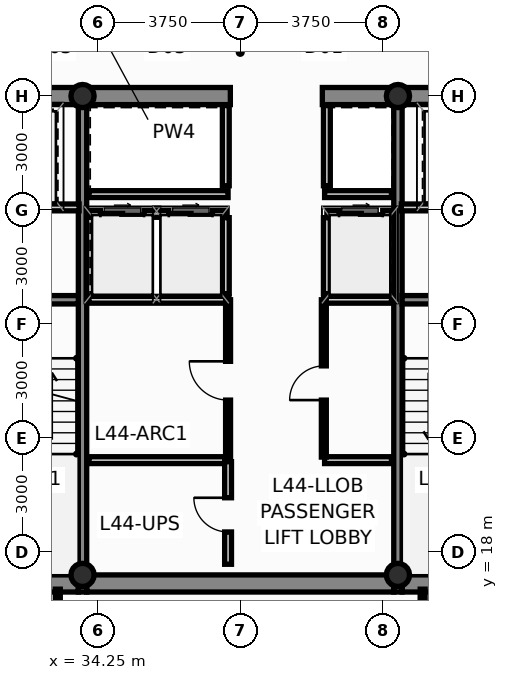
"""IFC4 building model, lengths in metres.
Left out: names, types, materials, properties, quantities, classifications, styles, units other than length and angle.
Written with IfcOpenShell. Run it as: python <this file> out.ifc"""

import sys

from ifc_helpers import new_model, si_unit, direction, frame, frame_2d, origin, origin_2d, place, context, subcontext, project, spatial, rectangle, hollow_circle, extrude, source, transform, mapped, element, fill, save


model = new_model("IFC4")
c1 = context("Model", 3, precision=1e-05, world=origin(), true_north=direction((0.0, 1.0)))
c2 = subcontext(c1, "Body", "Model", "MODEL_VIEW")
j1 = project(units=[si_unit("LENGTHUNIT", "METRE"), si_unit("PLANEANGLEUNIT", "RADIAN")], contexts=[c1])
p1 = place(None, origin())
s1 = spatial("IfcSite", under=j1, at=p1, CompositionType="ELEMENT")
p2 = place(p1, origin())
s2 = spatial("IfcBuilding", under=s1, at=p2, CompositionType="ELEMENT")
p3 = place(p2, frame((0.0, 0.0, 169.45)))
s3 = spatial("IfcBuildingStorey", under=s2, at=p3, CompositionType="ELEMENT", Elevation=169.45)
m1 = source(origin(), c2, "Body", "SweptSolid", [
    extrude(hollow_circle(Radius=0.305, WallThickness=0.025, at=origin_2d()), origin(), (0.0, 0.0, 1.0), 3.65),
])
for number, where, z_axis, x_axis in (
    (1, (33.85, 17.4, 0.0), (0.0, 0.0, 1.0), (1.0, 0.0, 0.0)),
    (2, (42.15, 17.4, 0.0), (0.0, 0.0, 1.0), (1.0, 0.0, 0.0)),
    (3, (33.85, 30.0, 0.0), (0.0, 0.0, 1.0), (1.0, 0.0, 0.0)),
    (4, (42.15, 30.0, 0.0), (0.0, 0.0, 1.0), (1.0, 0.0, 0.0)),
):
    element("IfcColumn", number, at=place(p3, frame(where, z_axis=z_axis, x_axis=x_axis)), inside=s3, PredefinedType="COLUMN", context=c2, shape_type="MappedRepresentation", body=[
        mapped(m1, transform((0.0, 0.0, 0.0), scale=1.0)),
    ])
p4 = place(p3, frame((30.84, 17.175, 0.0), z_axis=(0.0, 0.0, 1.0), x_axis=(1.0, 0.0, 0.0)))
e5 = element("IfcWall", 5, at=p4, inside=s3, PredefinedType="SHEAR", context=c2, shape_type="SweptSolid", body=[
    extrude(rectangle(XDim=2.9, YDim=0.45, at=frame_2d((1.45, 0.0))), origin(), (0.0, 0.0, 1.0), 3.65),
])
p5 = place(p3, frame((33.96, 17.175, 0.0), z_axis=(0.0, 0.0, 1.0), x_axis=(1.0, 0.0, 0.0)))
e6 = element("IfcWall", 6, at=p5, inside=s3, PredefinedType="SHEAR", context=c2, shape_type="SweptSolid", body=[
    extrude(rectangle(XDim=8.08, YDim=0.45, at=frame_2d((4.04, 0.0))), origin(), (0.0, 0.0, 1.0), 3.65),
])
for number, where, z_axis, x_axis in (
    (7, (42.26, 17.175, 0.0), (0.0, 0.0, 1.0), (1.0, 0.0, 0.0)),
    (8, (30.84, 30.0, 0.0), (0.0, 0.0, 1.0), (1.0, 0.0, 0.0)),
):
    element("IfcWall", number, at=place(p3, frame(where, z_axis=z_axis, x_axis=x_axis)), inside=s3, PredefinedType="SHEAR", context=c2, shape_type="SweptSolid", body=[
        extrude(rectangle(XDim=2.9, YDim=0.45, at=frame_2d((1.45, 0.0))), origin(), (0.0, 0.0, 1.0), 3.65),
    ])
p6 = place(p3, frame((33.96, 30.0, 0.0), z_axis=(0.0, 0.0, 1.0), x_axis=(1.0, 0.0, 0.0)))
e9 = element("IfcWall", 9, at=p6, inside=s3, PredefinedType="SHEAR", context=c2, shape_type="SweptSolid", body=[
    extrude(rectangle(XDim=3.78, YDim=0.45, at=frame_2d((1.89, 0.0))), origin(), (0.0, 0.0, 1.0), 3.65),
])
p7 = place(p3, frame((40.16, 30.0, 0.0), z_axis=(0.0, 0.0, 1.0), x_axis=(1.0, 0.0, 0.0)))
e10 = element("IfcWall", 10, at=p7, inside=s3, PredefinedType="SHEAR", context=c2, shape_type="SweptSolid", body=[
    extrude(rectangle(XDim=1.88, YDim=0.45, at=frame_2d((0.94, 0.0))), origin(), (0.0, 0.0, 1.0), 3.65),
])
p8 = place(p3, frame((42.26, 30.0, 0.0), z_axis=(0.0, 0.0, 1.0), x_axis=(1.0, 0.0, 0.0)))
e11 = element("IfcWall", 11, at=p8, inside=s3, PredefinedType="SHEAR", context=c2, shape_type="SweptSolid", body=[
    extrude(rectangle(XDim=2.9, YDim=0.45, at=frame_2d((1.45, 0.0))), origin(), (0.0, 0.0, 1.0), 3.65),
])
for number, where, z_axis, x_axis in (
    (12, (33.85, 16.95, 0.0), (0.0, 0.0, 1.0), (0.0, 1.0, 0.0)),
    (13, (42.15, 16.95, 0.0), (0.0, 0.0, 1.0), (0.0, 1.0, 0.0)),
):
    element("IfcWall", number, at=place(p3, frame(where, z_axis=z_axis, x_axis=x_axis)), inside=s3, PredefinedType="SHEAR", context=c2, shape_type="SweptSolid", body=[
        extrude(rectangle(XDim=13.275, YDim=0.22, at=frame_2d((6.638, 0.0))), origin(), (0.0, 0.0, 1.0), 3.65),
    ])
for number, where, z_axis, x_axis in (
    (14, (30.84, 24.64, 0.0), (0.0, 0.0, 1.0), (1.0, 0.0, 0.0)),
    (15, (42.26, 24.64, 0.0), (0.0, 0.0, 1.0), (1.0, 0.0, 0.0)),
):
    element("IfcWall", number, at=place(p3, frame(where, z_axis=z_axis, x_axis=x_axis)), inside=s3, PredefinedType="SHEAR", context=c2, shape_type="SweptSolid", body=[
        extrude(rectangle(XDim=2.9, YDim=0.22, at=frame_2d((1.45, 0.0))), origin(), (0.0, 0.0, 1.0), 3.65),
    ])
p9 = place(p3, frame((34.02, 26.9, 0.0), z_axis=(0.0, 0.0, 1.0), x_axis=(1.0, 0.0, 0.0)))
e16 = element("IfcWall", 16, at=p9, inside=s3, PredefinedType="PARTITIONING", context=c2, shape_type="SweptSolid", body=[
    extrude(rectangle(XDim=3.6, YDim=0.18, at=frame_2d((1.8, 0.0))), origin(), (0.0, 0.0, 1.0), 3.4),
])
p10 = place(p9, frame((0.3, 0.0, 0.0)))
e17 = element("IfcOpeningElement", 17, at=p10, cuts=e16, PredefinedType="OPENING", context=c2, shape_type="SweptSolid", body=[
    extrude(rectangle(XDim=1.15, YDim=2.2, at=frame_2d((0.575, 1.1))), frame((0.0, 0.102, 0.0), z_axis=(0.0, -1.0, 0.0), x_axis=(1.0, 0.0, 0.0)), (0.0, 0.0, 1.0), 0.204),
])
p11 = place(p9, frame((2.1, 0.0, 0.0)))
e18 = element("IfcOpeningElement", 18, at=p11, cuts=e16, PredefinedType="OPENING", context=c2, shape_type="SweptSolid", body=[
    extrude(rectangle(XDim=1.15, YDim=2.2, at=frame_2d((0.575, 1.1))), frame((0.0, 0.102, 0.0), z_axis=(0.0, -1.0, 0.0), x_axis=(1.0, 0.0, 0.0)), (0.0, 0.0, 1.0), 0.204),
])
p12 = place(p3, frame((40.28, 26.9, 0.0), z_axis=(0.0, 0.0, 1.0), x_axis=(1.0, 0.0, 0.0)))
e19 = element("IfcWall", 19, at=p12, inside=s3, PredefinedType="PARTITIONING", context=c2, shape_type="SweptSolid", body=[
    extrude(rectangle(XDim=1.7, YDim=0.18, at=frame_2d((0.85, 0.0))), origin(), (0.0, 0.0, 1.0), 3.4),
])
p13 = place(p12, frame((0.32, 0.0, 0.0)))
e20 = element("IfcOpeningElement", 20, at=p13, cuts=e19, PredefinedType="OPENING", context=c2, shape_type="SweptSolid", body=[
    extrude(rectangle(XDim=1.15, YDim=2.2, at=frame_2d((0.575, 1.1))), frame((0.0, 0.102, 0.0), z_axis=(0.0, -1.0, 0.0), x_axis=(1.0, 0.0, 0.0)), (0.0, 0.0, 1.0), 0.204),
])
for number, where, z_axis, x_axis in (
    (21, (37.62, 24.8, 0.0), (0.0, 0.0, 1.0), (0.0, 1.0, 0.0)),
    (22, (40.28, 24.8, 0.0), (0.0, 0.0, 1.0), (0.0, 1.0, 0.0)),
):
    element("IfcWall", number, at=place(p3, frame(where, z_axis=z_axis, x_axis=x_axis)), inside=s3, PredefinedType="PARTITIONING", context=c2, shape_type="SweptSolid", body=[
        extrude(rectangle(XDim=2.0, YDim=0.18, at=frame_2d((1.0, 0.0))), origin(), (0.0, 0.0, 1.0), 3.4),
    ])
p14 = place(p3, frame((34.02, 24.64, 0.0), z_axis=(0.0, 0.0, 1.0), x_axis=(1.0, 0.0, 0.0)))
e23 = element("IfcWall", 23, at=p14, inside=s3, PredefinedType="PARTITIONING", context=c2, shape_type="SweptSolid", body=[
    extrude(rectangle(XDim=3.68, YDim=0.18, at=frame_2d((1.84, 0.0))), origin(), (0.0, 0.0, 1.0), 3.4),
])
p15 = place(p3, frame((40.2, 24.64, 0.0), z_axis=(0.0, 0.0, 1.0), x_axis=(1.0, 0.0, 0.0)))
e24 = element("IfcWall", 24, at=p15, inside=s3, PredefinedType="PARTITIONING", context=c2, shape_type="SweptSolid", body=[
    extrude(rectangle(XDim=1.78, YDim=0.18, at=frame_2d((0.89, 0.0))), origin(), (0.0, 0.0, 1.0), 3.4),
])
p16 = place(p3, frame((34.02, 27.42, 0.0), z_axis=(0.0, 0.0, 1.0), x_axis=(1.0, 0.0, 0.0)))
e25 = element("IfcWall", 25, at=p16, inside=s3, PredefinedType="PARTITIONING", context=c2, shape_type="SweptSolid", body=[
    extrude(rectangle(XDim=3.66, YDim=0.18, at=frame_2d((1.83, 0.0))), origin(), (0.0, 0.0, 1.0), 3.4),
])
p17 = place(p3, frame((40.22, 27.42, 0.0), z_axis=(0.0, 0.0, 1.0), x_axis=(1.0, 0.0, 0.0)))
e26 = element("IfcWall", 26, at=p17, inside=s3, PredefinedType="PARTITIONING", context=c2, shape_type="SweptSolid", body=[
    extrude(rectangle(XDim=1.76, YDim=0.18, at=frame_2d((0.88, 0.0))), origin(), (0.0, 0.0, 1.0), 3.4),
])
for number, where, z_axis, x_axis in (
    (27, (37.62, 27.64, 0.0), (0.0, 0.0, 1.0), (0.0, 1.0, 0.0)),
    (28, (40.28, 27.64, 0.0), (0.0, 0.0, 1.0), (0.0, 1.0, 0.0)),
):
    element("IfcWall", number, at=place(p3, frame(where, z_axis=z_axis, x_axis=x_axis)), inside=s3, PredefinedType="PARTITIONING", context=c2, shape_type="SweptSolid", body=[
        extrude(rectangle(XDim=2.11, YDim=0.18, at=frame_2d((1.055, 0.0))), origin(), (0.0, 0.0, 1.0), 3.4),
    ])
for number, where, z_axis, x_axis in (
    (29, (30.86, 27.07, 0.0), (0.0, 0.0, 1.0), (1.0, 0.0, 0.0)),
    (30, (42.24, 27.07, 0.0), (0.0, 0.0, 1.0), (1.0, 0.0, 0.0)),
):
    element("IfcWall", number, at=place(p3, frame(where, z_axis=z_axis, x_axis=x_axis)), inside=s3, PredefinedType="PARTITIONING", context=c2, shape_type="SweptSolid", body=[
        extrude(rectangle(XDim=2.9, YDim=0.18, at=frame_2d((1.45, 0.0))), origin(), (0.0, 0.0, 1.0), 3.4),
    ])
p18 = place(p3, frame((34.02, 20.42, 0.0), z_axis=(0.0, 0.0, 1.0), x_axis=(1.0, 0.0, 0.0)))
e31 = element("IfcWall", 31, at=p18, inside=s3, PredefinedType="PARTITIONING", context=c2, shape_type="SweptSolid", body=[
    extrude(rectangle(XDim=3.64, YDim=0.18, at=frame_2d((1.82, 0.0))), origin(), (0.0, 0.0, 1.0), 3.4),
])
p19 = place(p3, frame((40.22, 20.42, 0.0), z_axis=(0.0, 0.0, 1.0), x_axis=(1.0, 0.0, 0.0)))
e32 = element("IfcWall", 32, at=p19, inside=s3, PredefinedType="PARTITIONING", context=c2, shape_type="SweptSolid", body=[
    extrude(rectangle(XDim=1.76, YDim=0.18, at=frame_2d((0.88, 0.0))), origin(), (0.0, 0.0, 1.0), 3.4),
])
p20 = place(p3, frame((37.68, 20.5, 0.0), z_axis=(0.0, 0.0, 1.0), x_axis=(0.0, 1.0, 0.0)))
e33 = element("IfcWall", 33, at=p20, inside=s3, PredefinedType="PARTITIONING", context=c2, shape_type="SweptSolid", body=[
    extrude(rectangle(XDim=4.14, YDim=0.13, at=frame_2d((2.07, 0.0))), origin(), (0.0, 0.0, 1.0), 3.4),
])
p21 = place(p20, frame((1.5, 0.0, 0.0)))
e34 = element("IfcOpeningElement", 34, at=p21, cuts=e33, PredefinedType="OPENING", context=c2, shape_type="SweptSolid", body=[
    extrude(rectangle(XDim=1.02, YDim=2.15, at=frame_2d((0.51, 1.075))), frame((0.0, 0.077, 0.0), z_axis=(0.0, -1.0, 0.0), x_axis=(1.0, 0.0, 0.0)), (0.0, 0.0, 1.0), 0.154),
])
p22 = place(p3, frame((40.2, 20.5, 0.0), z_axis=(0.0, 0.0, 1.0), x_axis=(0.0, 1.0, 0.0)))
e35 = element("IfcWall", 35, at=p22, inside=s3, PredefinedType="PARTITIONING", context=c2, shape_type="SweptSolid", body=[
    extrude(rectangle(XDim=4.14, YDim=0.13, at=frame_2d((2.07, 0.0))), origin(), (0.0, 0.0, 1.0), 3.4),
])
p23 = place(p22, frame((1.5, 0.0, 0.0)))
e36 = element("IfcOpeningElement", 36, at=p23, cuts=e35, PredefinedType="OPENING", context=c2, shape_type="SweptSolid", body=[
    extrude(rectangle(XDim=0.9, YDim=2.1, at=frame_2d((0.45, 1.05))), frame((0.0, 0.077, 0.0), z_axis=(0.0, -1.0, 0.0), x_axis=(1.0, 0.0, 0.0)), (0.0, 0.0, 1.0), 0.154),
])
p24 = place(p3, frame((37.68, 17.68, 0.0), z_axis=(0.0, 0.0, 1.0), x_axis=(0.0, 1.0, 0.0)))
e37 = element("IfcWall", 37, at=p24, inside=s3, PredefinedType="PARTITIONING", context=c2, shape_type="SweptSolid", body=[
    extrude(rectangle(XDim=2.7, YDim=0.18, at=frame_2d((1.35, 0.0))), origin(), (0.0, 0.0, 1.0), 3.4),
])
p25 = place(p24, frame((0.85, 0.0, 0.0)))
e38 = element("IfcOpeningElement", 38, at=p25, cuts=e37, PredefinedType="OPENING", context=c2, shape_type="SweptSolid", body=[
    extrude(rectangle(XDim=0.9, YDim=2.1, at=frame_2d((0.45, 1.05))), frame((0.0, 0.102, 0.0), z_axis=(0.0, -1.0, 0.0), x_axis=(1.0, 0.0, 0.0)), (0.0, 0.0, 1.0), 0.204),
])
for number, where, z_axis, x_axis in (
    (39, (33.2, 12.555, 0.0), (0.0, 0.0, 1.0), (0.0, 1.0, 0.0)),
    (40, (42.8, 12.555, 0.0), (0.0, 0.0, 1.0), (0.0, 1.0, 0.0)),
):
    element("IfcWall", number, at=place(p3, frame(where, z_axis=z_axis, x_axis=x_axis)), inside=s3, PredefinedType="PARTITIONING", context=c2, shape_type="SweptSolid", body=[
        extrude(rectangle(XDim=4.47, YDim=0.13, at=frame_2d((2.235, 0.0))), origin(), (0.0, 0.0, 1.0), 3.4),
    ])
p26 = place(p10, origin())
e41 = element("IfcDoor", 41, at=p26, inside=s3, OperationType="SLIDING_TO_LEFT", PredefinedType="DOOR", context=c2, shape_type="SweptSolid", body=[
    extrude(rectangle(XDim=1.15, YDim=2.2, at=frame_2d((0.575, 1.1))), frame((0.0, 0.025, 0.0), z_axis=(0.0, -1.0, 0.0), x_axis=(1.0, 0.0, 0.0)), (0.0, 0.0, 1.0), 0.05),
])
fill(e17, e41)
p27 = place(p11, origin())
e42 = element("IfcDoor", 42, at=p27, inside=s3, OperationType="SLIDING_TO_RIGHT", PredefinedType="DOOR", context=c2, shape_type="SweptSolid", body=[
    extrude(rectangle(XDim=1.15, YDim=2.2, at=frame_2d((0.575, 1.1))), frame((0.0, 0.025, 0.0), z_axis=(0.0, -1.0, 0.0), x_axis=(1.0, 0.0, 0.0)), (0.0, 0.0, 1.0), 0.05),
])
fill(e18, e42)
p28 = place(p13, origin())
e43 = element("IfcDoor", 43, at=p28, inside=s3, OperationType="SLIDING_TO_LEFT", PredefinedType="DOOR", context=c2, shape_type="SweptSolid", body=[
    extrude(rectangle(XDim=1.15, YDim=2.2, at=frame_2d((0.575, 1.1))), frame((0.0, 0.025, 0.0), z_axis=(0.0, -1.0, 0.0), x_axis=(1.0, 0.0, 0.0)), (0.0, 0.0, 1.0), 0.05),
])
fill(e20, e43)
p29 = place(p21, origin())
e44 = element("IfcDoor", 44, at=p29, inside=s3, OperationType="SINGLE_SWING_RIGHT", PredefinedType="DOOR", context=c2, shape_type="SweptSolid", body=[
    extrude(rectangle(XDim=1.02, YDim=2.15, at=frame_2d((0.51, 1.075))), frame((0.0, 0.025, 0.0), z_axis=(0.0, -1.0, 0.0), x_axis=(1.0, 0.0, 0.0)), (0.0, 0.0, 1.0), 0.05),
])
fill(e34, e44)
p30 = place(p23, origin())
e45 = element("IfcDoor", 45, at=p30, inside=s3, OperationType="SINGLE_SWING_LEFT", PredefinedType="DOOR", context=c2, shape_type="SweptSolid", body=[
    extrude(rectangle(XDim=0.9, YDim=2.1, at=frame_2d((0.45, 1.05))), frame((0.0, 0.025, 0.0), z_axis=(0.0, -1.0, 0.0), x_axis=(1.0, 0.0, 0.0)), (0.0, 0.0, 1.0), 0.05),
])
fill(e36, e45)
p31 = place(p25, origin())
e46 = element("IfcDoor", 46, at=p31, inside=s3, OperationType="SINGLE_SWING_RIGHT", PredefinedType="DOOR", context=c2, shape_type="SweptSolid", body=[
    extrude(rectangle(XDim=0.9, YDim=2.1, at=frame_2d((0.45, 1.05))), frame((0.0, 0.025, 0.0), z_axis=(0.0, -1.0, 0.0), x_axis=(1.0, 0.0, 0.0)), (0.0, 0.0, 1.0), 0.05),
])
fill(e38, e46)
save(model, sys.argv[1])
